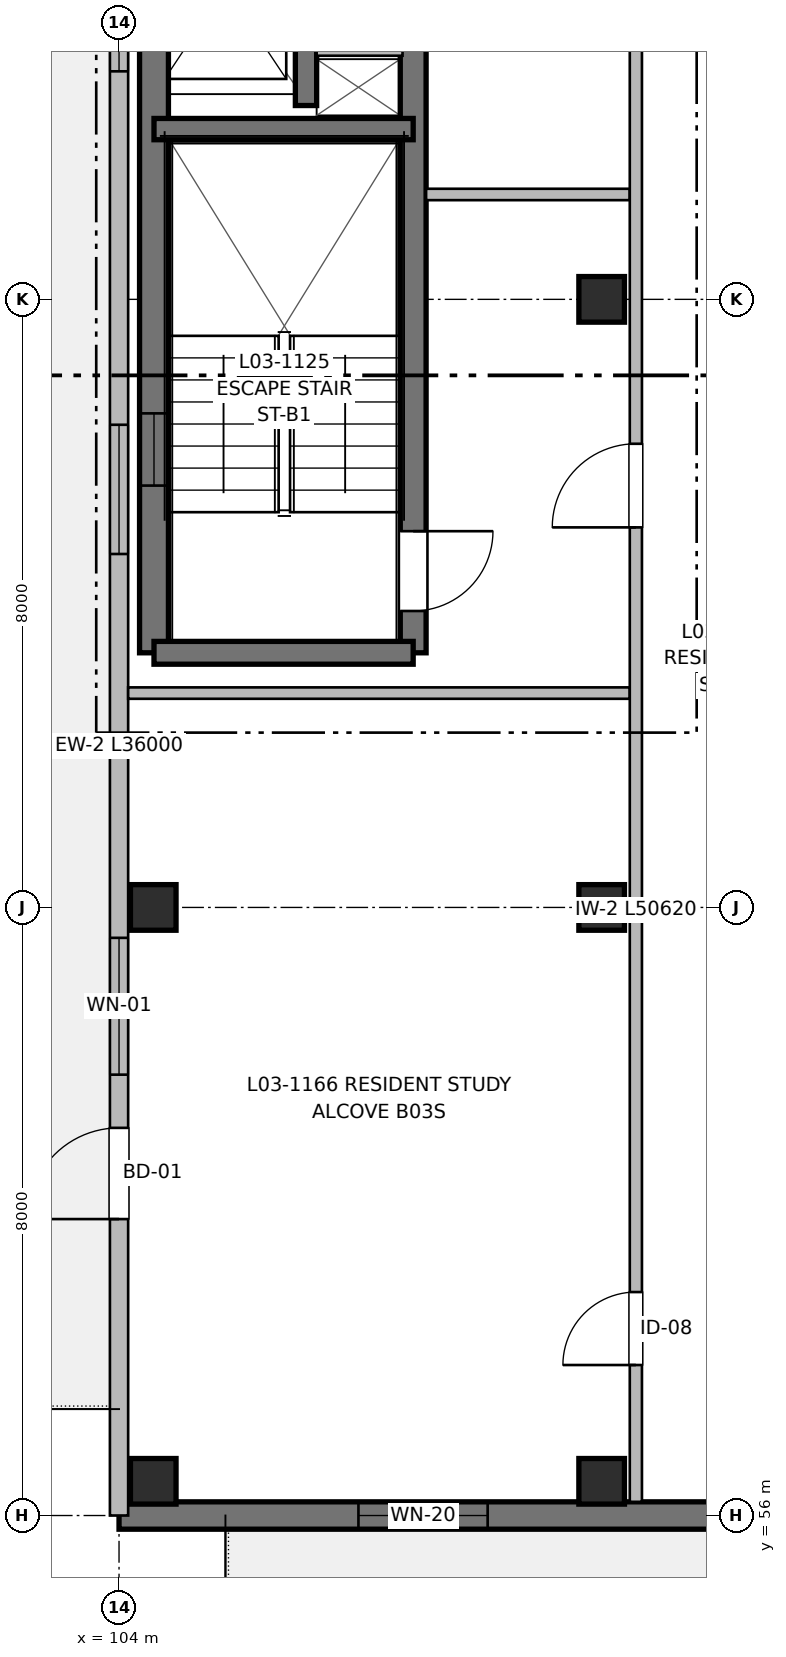
"""IFC4 building model, lengths in metres.
Left out: names, types, materials, properties, quantities, classifications, styles, units other than length and angle.
Written with IfcOpenShell. Run it as: python <this file> out.ifc"""

import sys

from ifc_helpers import new_model, si_unit, direction, frame, frame_2d, origin, origin_2d, place, context, subcontext, project, spatial, rectangle, extrude, element, fill, save


model = new_model("IFC4")
c1 = context("Model", 3, precision=1e-05, world=origin(), true_north=direction((0.0, 1.0)))
c2 = subcontext(c1, "Body", "Model", "MODEL_VIEW")
j1 = project(units=[si_unit("LENGTHUNIT", "METRE"), si_unit("PLANEANGLEUNIT", "RADIAN")], contexts=[c1])
p1 = place(None, origin())
s1 = spatial("IfcSite", under=j1, at=p1, CompositionType="ELEMENT")
p2 = place(p1, origin())
s2 = spatial("IfcBuilding", under=s1, at=p2, CompositionType="ELEMENT")
p3 = place(p2, frame((0.0, 0.0, 10.56)))
s3 = spatial("IfcBuildingStorey", under=s2, at=p3, CompositionType="ELEMENT", Elevation=10.56)
for number, where, z_axis, x_axis in (
    (1, (104.45, 56.45, 0.0), (0.0, 0.0, 1.0), (1.0, 0.0, 0.0)),
    (2, (104.45, 64.0, 0.0), (0.0, 0.0, 1.0), (1.0, 0.0, 0.0)),
    (3, (110.35, 56.45, 0.0), (0.0, 0.0, 1.0), (1.0, 0.0, 0.0)),
    (4, (110.35, 64.0, 0.0), (0.0, 0.0, 1.0), (1.0, 0.0, 0.0)),
    (5, (110.35, 72.0, 0.0), (0.0, 0.0, 1.0), (1.0, 0.0, 0.0)),
):
    element("IfcColumn", number, at=place(p3, frame(where, z_axis=z_axis, x_axis=x_axis)), inside=s3, PredefinedType="COLUMN", context=c2, shape_type="SweptSolid", body=[
        extrude(rectangle(XDim=0.6, YDim=0.6, at=origin_2d()), origin(), (0.0, 0.0, 1.0), 3.2),
    ])
p4 = place(p3, frame((104.46, 67.35, 0.0), z_axis=(0.0, 0.0, 1.0), x_axis=(0.0, 1.0, 0.0)))
e6 = element("IfcWall", 6, at=p4, inside=s3, PredefinedType="SHEAR", context=c2, shape_type="SweptSolid", body=[
    extrude(rectangle(XDim=12.45, YDim=0.38, at=frame_2d((6.225, 0.0))), origin(), (0.0, 0.0, 1.0), 3.2),
])
p5 = place(p4, frame((2.2, 0.0, 0.97)))
e7 = element("IfcOpeningElement", 7, at=p5, cuts=e6, PredefinedType="OPENING", context=c2, shape_type="SweptSolid", body=[
    extrude(rectangle(XDim=0.95, YDim=1.25, at=frame_2d((0.475, 0.625))), frame((0.0, 0.2, 0.0), z_axis=(0.0, -1.0, 0.0), x_axis=(1.0, 0.0, 0.0)), (0.0, 0.0, 1.0), 0.4),
])
p6 = place(p3, frame((107.87, 79.8, 0.0), z_axis=(0.0, 0.0, 1.0), x_axis=(0.0, -1.0, 0.0)))
e8 = element("IfcWall", 8, at=p6, inside=s3, PredefinedType="SHEAR", context=c2, shape_type="SweptSolid", body=[
    extrude(rectangle(XDim=12.45, YDim=0.34, at=frame_2d((6.225, 0.0))), origin(), (0.0, 0.0, 1.0), 3.2),
])
p7 = place(p6, frame((10.85, 0.0, 0.0)))
e9 = element("IfcOpeningElement", 9, at=p7, cuts=e8, PredefinedType="OPENING", context=c2, shape_type="SweptSolid", body=[
    extrude(rectangle(XDim=1.05, YDim=2.15, at=frame_2d((0.525, 1.075))), frame((0.0, 0.18, 0.0), z_axis=(0.0, -1.0, 0.0), x_axis=(1.0, 0.0, 0.0)), (0.0, 0.0, 1.0), 0.36),
])
p8 = place(p3, frame((107.87, 67.35, 0.0), z_axis=(0.0, 0.0, 1.0), x_axis=(-1.0, 0.0, 0.0)))
e10 = element("IfcWall", 10, at=p8, inside=s3, PredefinedType="SHEAR", context=c2, shape_type="SweptSolid", body=[
    extrude(rectangle(XDim=3.41, YDim=0.3, at=frame_2d((1.705, 0.0))), origin(), (0.0, 0.0, 1.0), 3.2),
])
p9 = place(p3, frame((104.46, 74.24, 0.0), z_axis=(0.0, 0.0, 1.0), x_axis=(1.0, 0.0, 0.0)))
e11 = element("IfcWall", 11, at=p9, inside=s3, PredefinedType="SHEAR", context=c2, shape_type="SweptSolid", body=[
    extrude(rectangle(XDim=3.41, YDim=0.28, at=frame_2d((1.705, 0.0))), origin(), (0.0, 0.0, 1.0), 3.2),
])
p10 = place(p3, frame((106.46, 74.55, 0.0), z_axis=(0.0, 0.0, 1.0), x_axis=(0.0, 1.0, 0.0)))
e12 = element("IfcWall", 12, at=p10, inside=s3, PredefinedType="SHEAR", context=c2, shape_type="SweptSolid", body=[
    extrude(rectangle(XDim=5.25, YDim=0.28, at=frame_2d((2.625, 0.0))), origin(), (0.0, 0.0, 1.0), 3.2),
])
p11 = place(p10, frame((1.15, 0.0, 0.0)))
e13 = element("IfcOpeningElement", 13, at=p11, cuts=e12, PredefinedType="OPENING", context=c2, shape_type="SweptSolid", body=[
    extrude(rectangle(XDim=1.0, YDim=2.15, at=frame_2d((0.5, 1.075))), frame((0.0, 0.15, 0.0), z_axis=(0.0, -1.0, 0.0), x_axis=(1.0, 0.0, 0.0)), (0.0, 0.0, 1.0), 0.3),
])
p12 = place(p10, frame((3.85, 0.0, 0.0)))
e14 = element("IfcOpeningElement", 14, at=p12, cuts=e12, PredefinedType="OPENING", context=c2, shape_type="SweptSolid", body=[
    extrude(rectangle(XDim=0.9, YDim=2.15, at=frame_2d((0.45, 1.075))), frame((0.0, 0.15, 0.0), z_axis=(0.0, -1.0, 0.0), x_axis=(1.0, 0.0, 0.0)), (0.0, 0.0, 1.0), 0.3),
])
p13 = place(p3, frame((106.6, 75.28, 0.0), z_axis=(0.0, 0.0, 1.0), x_axis=(1.0, 0.0, 0.0)))
e15 = element("IfcWall", 15, at=p13, inside=s3, PredefinedType="PARTITIONING", context=c2, shape_type="SweptSolid", body=[
    extrude(rectangle(XDim=1.13, YDim=0.15, at=frame_2d((0.565, 0.0))), origin(), (0.0, 0.0, 1.0), 2.95),
])
p14 = place(p3, frame((120.0, 56.0, 0.0), z_axis=(0.0, 0.0, 1.0), x_axis=(-1.0, 0.0, 0.0)))
e16 = element("IfcWall", 16, at=p14, inside=s3, PredefinedType="SHEAR", context=c2, shape_type="SweptSolid", body=[
    extrude(rectangle(XDim=16.0, YDim=0.36, at=frame_2d((8.0, 0.0))), origin(), (0.0, 0.0, 1.0), 2.98),
])
p15 = place(p14, frame((2.55, 0.0, 0.0)))
e17 = element("IfcOpeningElement", 17, at=p15, cuts=e16, PredefinedType="OPENING", context=c2, shape_type="SweptSolid", body=[
    extrude(rectangle(XDim=1.2, YDim=2.2, at=frame_2d((0.6, 1.1))), frame((0.0, 0.19, 0.0), z_axis=(0.0, -1.0, 0.0), x_axis=(1.0, 0.0, 0.0)), (0.0, 0.0, 1.0), 0.38),
])
p16 = place(p14, frame((4.85, 0.0, 0.72)))
e18 = element("IfcOpeningElement", 18, at=p16, cuts=e16, PredefinedType="OPENING", context=c2, shape_type="SweptSolid", body=[
    extrude(rectangle(XDim=1.8, YDim=1.5, at=frame_2d((0.9, 0.75))), frame((0.0, 0.19, 0.0), z_axis=(0.0, -1.0, 0.0), x_axis=(1.0, 0.0, 0.0)), (0.0, 0.0, 1.0), 0.38),
])
p17 = place(p14, frame((11.15, 0.0, 0.72)))
e19 = element("IfcOpeningElement", 19, at=p17, cuts=e16, PredefinedType="OPENING", context=c2, shape_type="SweptSolid", body=[
    extrude(rectangle(XDim=1.7, YDim=1.5, at=frame_2d((0.85, 0.75))), frame((0.0, 0.19, 0.0), z_axis=(0.0, -1.0, 0.0), x_axis=(1.0, 0.0, 0.0)), (0.0, 0.0, 1.0), 0.38),
])
p18 = place(p3, frame((104.0, 56.0, 0.0), z_axis=(0.0, 0.0, 1.0), x_axis=(0.0, 1.0, 0.0)))
e20 = element("IfcWall", 20, at=p18, inside=s3, PredefinedType="SOLIDWALL", context=c2, shape_type="SweptSolid", body=[
    extrude(rectangle(XDim=36.0, YDim=0.24, at=frame_2d((18.0, 0.0))), origin(), (0.0, 0.0, 1.0), 2.98),
])
p19 = place(p18, frame((3.9, 0.0, 0.0)))
e21 = element("IfcOpeningElement", 21, at=p19, cuts=e20, PredefinedType="OPENING", context=c2, shape_type="SweptSolid", body=[
    extrude(rectangle(XDim=1.2, YDim=2.2, at=frame_2d((0.6, 1.1))), frame((0.0, 0.13, 0.0), z_axis=(0.0, -1.0, 0.0), x_axis=(1.0, 0.0, 0.0)), (0.0, 0.0, 1.0), 0.26),
])
p20 = place(p18, frame((5.8, 0.0, 0.72)))
e22 = element("IfcOpeningElement", 22, at=p20, cuts=e20, PredefinedType="OPENING", context=c2, shape_type="SweptSolid", body=[
    extrude(rectangle(XDim=1.8, YDim=1.5, at=frame_2d((0.9, 0.75))), frame((0.0, 0.13, 0.0), z_axis=(0.0, -1.0, 0.0), x_axis=(1.0, 0.0, 0.0)), (0.0, 0.0, 1.0), 0.26),
])
p21 = place(p18, frame((12.65, 0.0, 0.72)))
e23 = element("IfcOpeningElement", 23, at=p21, cuts=e20, PredefinedType="OPENING", context=c2, shape_type="SweptSolid", body=[
    extrude(rectangle(XDim=1.7, YDim=1.5, at=frame_2d((0.85, 0.75))), frame((0.0, 0.13, 0.0), z_axis=(0.0, -1.0, 0.0), x_axis=(1.0, 0.0, 0.0)), (0.0, 0.0, 1.0), 0.26),
])
p22 = place(p18, frame((19.0, 0.0, 0.57)))
e24 = element("IfcOpeningElement", 24, at=p22, cuts=e20, PredefinedType="OPENING", context=c2, shape_type="SweptSolid", body=[
    extrude(rectangle(XDim=2.3, YDim=1.65, at=frame_2d((1.15, 0.825))), frame((0.0, 0.13, 0.0), z_axis=(0.0, -1.0, 0.0), x_axis=(1.0, 0.0, 0.0)), (0.0, 0.0, 1.0), 0.26),
])
p23 = place(p18, frame((30.775, 0.0, 0.77)))
e25 = element("IfcOpeningElement", 25, at=p23, cuts=e20, PredefinedType="OPENING", context=c2, shape_type="SweptSolid", body=[
    extrude(rectangle(XDim=1.45, YDim=1.45, at=frame_2d((0.725, 0.725))), frame((0.0, 0.13, 0.0), z_axis=(0.0, -1.0, 0.0), x_axis=(1.0, 0.0, 0.0)), (0.0, 0.0, 1.0), 0.26),
])
p24 = place(p3, frame((104.12, 66.82, 0.0), z_axis=(0.0, 0.0, 1.0), x_axis=(1.0, 0.0, 0.0)))
e26 = element("IfcWall", 26, at=p24, inside=s3, PredefinedType="PARTITIONING", context=c2, shape_type="SweptSolid", body=[
    extrude(rectangle(XDim=6.6, YDim=0.15, at=frame_2d((3.3, 0.0))), origin(), (0.0, 0.0, 1.0), 2.935),
])
p25 = place(p3, frame((108.04, 73.38, 0.0), z_axis=(0.0, 0.0, 1.0), x_axis=(1.0, 0.0, 0.0)))
e27 = element("IfcWall", 27, at=p25, inside=s3, PredefinedType="PARTITIONING", context=c2, shape_type="SweptSolid", body=[
    extrude(rectangle(XDim=2.68, YDim=0.15, at=frame_2d((1.34, 0.0))), origin(), (0.0, 0.0, 1.0), 2.935),
])
p26 = place(p3, frame((110.8, 56.18, 0.0), z_axis=(0.0, 0.0, 1.0), x_axis=(0.0, 1.0, 0.0)))
e28 = element("IfcWall", 28, at=p26, inside=s3, PredefinedType="PARTITIONING", context=c2, shape_type="SweptSolid", body=[
    extrude(rectangle(XDim=50.62, YDim=0.16, at=frame_2d((25.31, 0.0))), origin(), (0.0, 0.0, 1.0), 2.935),
])
p27 = place(p26, frame((12.82, 0.0, 0.0)))
e29 = element("IfcOpeningElement", 29, at=p27, cuts=e28, PredefinedType="OPENING", context=c2, shape_type="SweptSolid", body=[
    extrude(rectangle(XDim=1.1, YDim=2.15, at=frame_2d((0.55, 1.075))), frame((0.0, 0.09, 0.0), z_axis=(0.0, -1.0, 0.0), x_axis=(1.0, 0.0, 0.0)), (0.0, 0.0, 1.0), 0.18),
])
p28 = place(p26, frame((19.22, 0.0, 0.0)))
e30 = element("IfcOpeningElement", 30, at=p28, cuts=e28, PredefinedType="OPENING", context=c2, shape_type="SweptSolid", body=[
    extrude(rectangle(XDim=1.6, YDim=2.15, at=frame_2d((0.8, 1.075))), frame((0.0, 0.09, 0.0), z_axis=(0.0, -1.0, 0.0), x_axis=(1.0, 0.0, 0.0)), (0.0, 0.0, 1.0), 0.18),
])
p29 = place(p26, frame((1.8, 0.0, 0.0)))
e31 = element("IfcOpeningElement", 31, at=p29, cuts=e28, PredefinedType="OPENING", context=c2, shape_type="SweptSolid", body=[
    extrude(rectangle(XDim=0.96, YDim=2.15, at=frame_2d((0.48, 1.075))), frame((0.0, 0.09, 0.0), z_axis=(0.0, -1.0, 0.0), x_axis=(1.0, 0.0, 0.0)), (0.0, 0.0, 1.0), 0.18),
])
p30 = place(p26, frame((32.825, 0.0, 0.0)))
e32 = element("IfcOpeningElement", 32, at=p30, cuts=e28, PredefinedType="OPENING", context=c2, shape_type="SweptSolid", body=[
    extrude(rectangle(XDim=0.98, YDim=2.15, at=frame_2d((0.49, 1.075))), frame((0.0, 0.09, 0.0), z_axis=(0.0, -1.0, 0.0), x_axis=(1.0, 0.0, 0.0)), (0.0, 0.0, 1.0), 0.18),
])
p31 = place(p26, frame((40.635, 0.0, 0.0)))
e33 = element("IfcOpeningElement", 33, at=p31, cuts=e28, PredefinedType="OPENING", context=c2, shape_type="SweptSolid", body=[
    extrude(rectangle(XDim=0.98, YDim=2.15, at=frame_2d((0.49, 1.075))), frame((0.0, 0.09, 0.0), z_axis=(0.0, -1.0, 0.0), x_axis=(1.0, 0.0, 0.0)), (0.0, 0.0, 1.0), 0.18),
])
p32 = place(p7, origin())
e34 = element("IfcDoor", 34, at=p32, inside=s3, OperationType="SINGLE_SWING_LEFT", PredefinedType="DOOR", context=c2, shape_type="SweptSolid", body=[
    extrude(rectangle(XDim=1.05, YDim=2.15, at=frame_2d((0.525, 1.075))), frame((0.0, 0.025, 0.0), z_axis=(0.0, -1.0, 0.0), x_axis=(1.0, 0.0, 0.0)), (0.0, 0.0, 1.0), 0.05),
])
fill(e9, e34)
p33 = place(p5, origin())
e35 = element("IfcWindow", 35, at=p33, inside=s3, PartitioningType="SINGLE_PANEL", PredefinedType="WINDOW", context=c2, shape_type="SweptSolid", body=[
    extrude(rectangle(XDim=0.95, YDim=1.25, at=frame_2d((0.475, 0.625))), frame((0.0, 0.03, 0.0), z_axis=(0.0, -1.0, 0.0), x_axis=(1.0, 0.0, 0.0)), (0.0, 0.0, 1.0), 0.06),
])
fill(e7, e35)
p34 = place(p17, origin())
e36 = element("IfcWindow", 36, at=p34, inside=s3, PartitioningType="SINGLE_PANEL", PredefinedType="WINDOW", context=c2, shape_type="SweptSolid", body=[
    extrude(rectangle(XDim=1.7, YDim=1.5, at=frame_2d((0.85, 0.75))), frame((0.0, 0.03, 0.0), z_axis=(0.0, -1.0, 0.0), x_axis=(1.0, 0.0, 0.0)), (0.0, 0.0, 1.0), 0.06),
])
fill(e19, e36)
p35 = place(p19, origin())
e37 = element("IfcDoor", 37, at=p35, inside=s3, OperationType="SINGLE_SWING_LEFT", PredefinedType="DOOR", context=c2, shape_type="SweptSolid", body=[
    extrude(rectangle(XDim=1.2, YDim=2.2, at=frame_2d((0.6, 1.1))), frame((0.0, 0.025, 0.0), z_axis=(0.0, -1.0, 0.0), x_axis=(1.0, 0.0, 0.0)), (0.0, 0.0, 1.0), 0.05),
])
fill(e21, e37)
p36 = place(p20, origin())
e38 = element("IfcWindow", 38, at=p36, inside=s3, PartitioningType="SINGLE_PANEL", PredefinedType="WINDOW", context=c2, shape_type="SweptSolid", body=[
    extrude(rectangle(XDim=1.8, YDim=1.5, at=frame_2d((0.9, 0.75))), frame((0.0, 0.03, 0.0), z_axis=(0.0, -1.0, 0.0), x_axis=(1.0, 0.0, 0.0)), (0.0, 0.0, 1.0), 0.06),
])
fill(e22, e38)
p37 = place(p21, origin())
e39 = element("IfcWindow", 39, at=p37, inside=s3, PartitioningType="SINGLE_PANEL", PredefinedType="WINDOW", context=c2, shape_type="SweptSolid", body=[
    extrude(rectangle(XDim=1.7, YDim=1.5, at=frame_2d((0.85, 0.75))), frame((0.0, 0.03, 0.0), z_axis=(0.0, -1.0, 0.0), x_axis=(1.0, 0.0, 0.0)), (0.0, 0.0, 1.0), 0.06),
])
fill(e23, e39)
p38 = place(p22, origin())
e40 = element("IfcWindow", 40, at=p38, inside=s3, PartitioningType="SINGLE_PANEL", PredefinedType="WINDOW", context=c2, shape_type="SweptSolid", body=[
    extrude(rectangle(XDim=2.3, YDim=1.65, at=frame_2d((1.15, 0.825))), frame((0.0, 0.03, 0.0), z_axis=(0.0, -1.0, 0.0), x_axis=(1.0, 0.0, 0.0)), (0.0, 0.0, 1.0), 0.06),
])
fill(e24, e40)
p39 = place(p27, origin())
e41 = element("IfcDoor", 41, at=p39, inside=s3, OperationType="SINGLE_SWING_LEFT", PredefinedType="DOOR", context=c2, shape_type="SweptSolid", body=[
    extrude(rectangle(XDim=1.1, YDim=2.15, at=frame_2d((0.55, 1.075))), frame((0.0, 0.025, 0.0), z_axis=(0.0, -1.0, 0.0), x_axis=(1.0, 0.0, 0.0)), (0.0, 0.0, 1.0), 0.05),
])
fill(e29, e41)
p40 = place(p29, origin())
e42 = element("IfcDoor", 42, at=p40, inside=s3, OperationType="SINGLE_SWING_LEFT", PredefinedType="DOOR", context=c2, shape_type="SweptSolid", body=[
    extrude(rectangle(XDim=0.96, YDim=2.15, at=frame_2d((0.48, 1.075))), frame((0.0, 0.025, 0.0), z_axis=(0.0, -1.0, 0.0), x_axis=(1.0, 0.0, 0.0)), (0.0, 0.0, 1.0), 0.05),
])
fill(e31, e42)
save(model, sys.argv[1])
